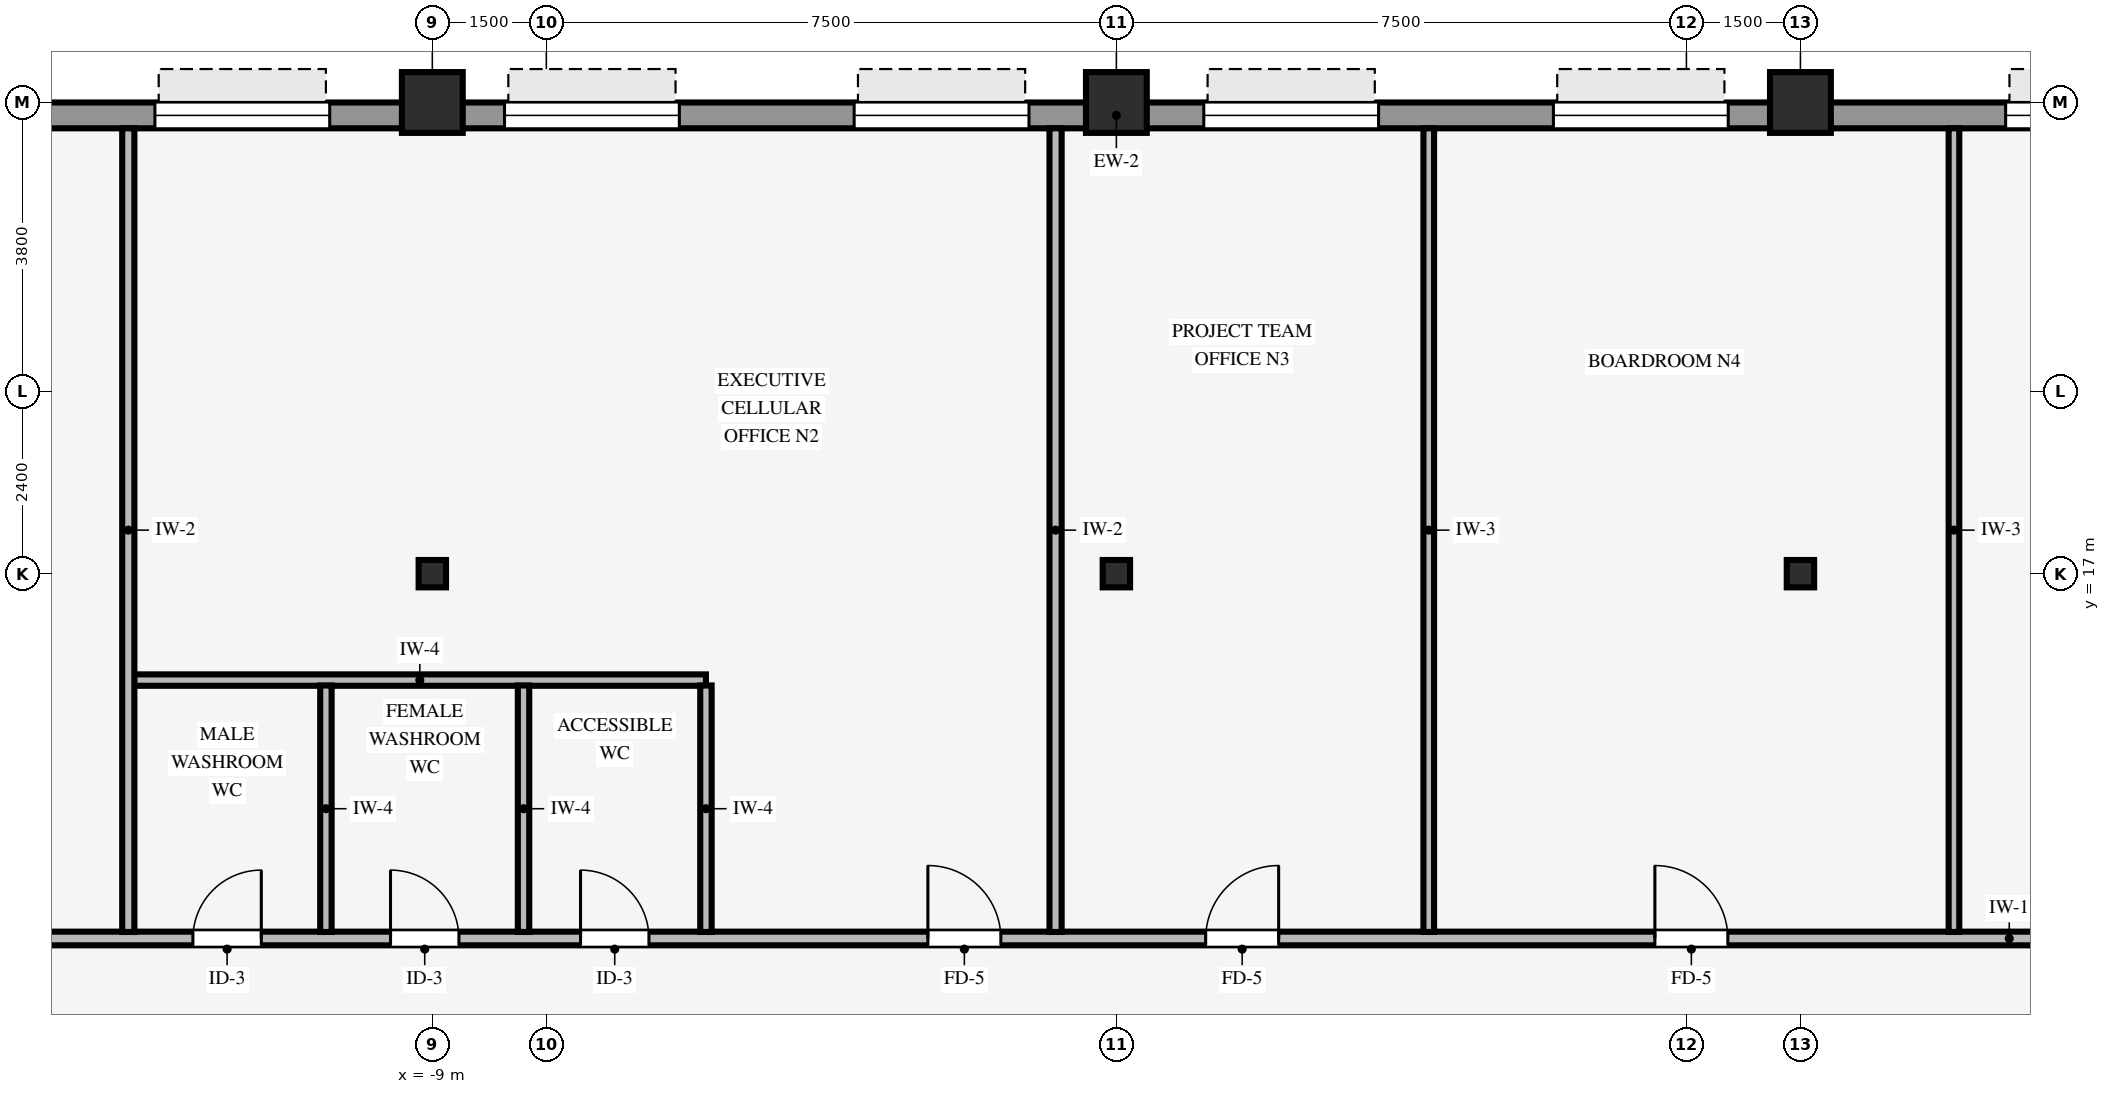
"""IFC4 building model, lengths in metres.
Left out: names, types, materials, properties, quantities, classifications, styles, units other than length and angle.
Written with IfcOpenShell. Run it as: python <this file> out.ifc"""

import sys

from ifc_helpers import new_model, si_unit, direction, frame, frame_2d, origin, origin_2d, place, context, subcontext, project, spatial, rectangle, hollow_rectangle, i_section, extrude, source, transform, mapped, element, fill, save


model = new_model("IFC4")
c1 = context("Model", 3, precision=1e-05, world=origin(), true_north=direction((0.0, 1.0)))
c2 = subcontext(c1, "Body", "Model", "MODEL_VIEW")
j1 = project(units=[si_unit("LENGTHUNIT", "METRE"), si_unit("PLANEANGLEUNIT", "RADIAN")], contexts=[c1])
p1 = place(None, origin())
s1 = spatial("IfcSite", under=j1, at=p1, CompositionType="ELEMENT")
p2 = place(p1, origin())
s2 = spatial("IfcBuilding", under=s1, at=p2, CompositionType="ELEMENT")
p3 = place(p2, frame((0.0, 0.0, 75.05)))
s3 = spatial("IfcBuildingStorey", under=s2, at=p3, CompositionType="ELEMENT", Elevation=75.05)
for number, where, z_axis, x_axis in (
    (1, (-9.0, 23.2, 0.0), (0.0, 0.0, 1.0), (1.0, 0.0, 0.0)),
    (2, (0.0, 23.2, 0.0), (0.0, 0.0, 1.0), (1.0, 0.0, 0.0)),
    (3, (9.0, 23.2, 0.0), (0.0, 0.0, 1.0), (1.0, 0.0, 0.0)),
):
    element("IfcColumn", number, at=place(p3, frame(where, z_axis=z_axis, x_axis=x_axis)), inside=s3, PredefinedType="COLUMN", context=c2, shape_type="SweptSolid", body=[
        extrude(hollow_rectangle(XDim=0.8, YDim=0.8, WallThickness=0.055, InnerFilletRadius=0.055, OuterFilletRadius=0.11, at=origin_2d()), origin(), (0.0, 0.0, 1.0), 3.37),
    ])
for number, where, z_axis, x_axis in (
    (4, (0.0, 17.0, 0.0), (0.0, 0.0, 1.0), (1.0, 0.0, 0.0)),
    (5, (-9.0, 17.0, 0.0), (0.0, 0.0, 1.0), (1.0, 0.0, 0.0)),
    (6, (9.0, 17.0, 0.0), (0.0, 0.0, 1.0), (1.0, 0.0, 0.0)),
):
    element("IfcColumn", number, at=place(p3, frame(where, z_axis=z_axis, x_axis=x_axis)), inside=s3, PredefinedType="COLUMN", context=c2, shape_type="SweptSolid", body=[
        extrude(i_section(OverallWidth=0.36, OverallDepth=0.36, WebThickness=0.021, FlangeThickness=0.021, FilletRadius=0.018, at=origin_2d()), origin(), (0.0, 0.0, 1.0), 3.37),
    ])
p4 = place(p3, frame((-19.4, 23.03, 0.0), z_axis=(0.0, 0.0, 1.0), x_axis=(1.0, 0.0, 0.0)))
e7 = element("IfcWall", 7, at=p4, inside=s3, PredefinedType="STANDARD", context=c2, shape_type="SweptSolid", body=[
    extrude(rectangle(XDim=38.8, YDim=0.34, at=frame_2d((19.4, 0.0))), origin(), (0.0, 0.0, 1.0), 2.705),
])
p5 = place(p4, frame((2.15, 0.0, 0.8)))
e8 = element("IfcOpeningElement", 8, at=p5, cuts=e7, PredefinedType="OPENING", context=c2, shape_type="SweptSolid", body=[
    extrude(rectangle(XDim=2.3, YDim=1.62, at=frame_2d((1.15, 0.81))), frame((0.0, 0.18, 0.0), z_axis=(0.0, -1.0, 0.0), x_axis=(1.0, 0.0, 0.0)), (0.0, 0.0, 1.0), 0.36),
])
p6 = place(p4, frame((6.75, 0.0, 0.8)))
e9 = element("IfcOpeningElement", 9, at=p6, cuts=e7, PredefinedType="OPENING", context=c2, shape_type="SweptSolid", body=[
    extrude(rectangle(XDim=2.3, YDim=1.62, at=frame_2d((1.15, 0.81))), frame((0.0, 0.18, 0.0), z_axis=(0.0, -1.0, 0.0), x_axis=(1.0, 0.0, 0.0)), (0.0, 0.0, 1.0), 0.36),
])
p7 = place(p4, frame((11.35, 0.0, 0.8)))
e10 = element("IfcOpeningElement", 10, at=p7, cuts=e7, PredefinedType="OPENING", context=c2, shape_type="SweptSolid", body=[
    extrude(rectangle(XDim=2.3, YDim=1.62, at=frame_2d((1.15, 0.81))), frame((0.0, 0.18, 0.0), z_axis=(0.0, -1.0, 0.0), x_axis=(1.0, 0.0, 0.0)), (0.0, 0.0, 1.0), 0.36),
])
p8 = place(p4, frame((15.95, 0.0, 0.8)))
e11 = element("IfcOpeningElement", 11, at=p8, cuts=e7, PredefinedType="OPENING", context=c2, shape_type="SweptSolid", body=[
    extrude(rectangle(XDim=2.3, YDim=1.62, at=frame_2d((1.15, 0.81))), frame((0.0, 0.18, 0.0), z_axis=(0.0, -1.0, 0.0), x_axis=(1.0, 0.0, 0.0)), (0.0, 0.0, 1.0), 0.36),
])
p9 = place(p4, frame((20.55, 0.0, 0.8)))
e12 = element("IfcOpeningElement", 12, at=p9, cuts=e7, PredefinedType="OPENING", context=c2, shape_type="SweptSolid", body=[
    extrude(rectangle(XDim=2.3, YDim=1.62, at=frame_2d((1.15, 0.81))), frame((0.0, 0.18, 0.0), z_axis=(0.0, -1.0, 0.0), x_axis=(1.0, 0.0, 0.0)), (0.0, 0.0, 1.0), 0.36),
])
p10 = place(p4, frame((25.15, 0.0, 0.8)))
e13 = element("IfcOpeningElement", 13, at=p10, cuts=e7, PredefinedType="OPENING", context=c2, shape_type="SweptSolid", body=[
    extrude(rectangle(XDim=2.3, YDim=1.62, at=frame_2d((1.15, 0.81))), frame((0.0, 0.18, 0.0), z_axis=(0.0, -1.0, 0.0), x_axis=(1.0, 0.0, 0.0)), (0.0, 0.0, 1.0), 0.36),
])
p11 = place(p4, frame((31.1, 0.0, 0.8)))
e14 = element("IfcOpeningElement", 14, at=p11, cuts=e7, PredefinedType="OPENING", context=c2, shape_type="SweptSolid", body=[
    extrude(rectangle(XDim=2.3, YDim=1.62, at=frame_2d((1.15, 0.81))), frame((0.0, 0.18, 0.0), z_axis=(0.0, -1.0, 0.0), x_axis=(1.0, 0.0, 0.0)), (0.0, 0.0, 1.0), 0.36),
])
p12 = place(p4, frame((34.35, 0.0, 0.8)))
e15 = element("IfcOpeningElement", 15, at=p12, cuts=e7, PredefinedType="OPENING", context=c2, shape_type="SweptSolid", body=[
    extrude(rectangle(XDim=2.3, YDim=1.62, at=frame_2d((1.15, 0.81))), frame((0.0, 0.18, 0.0), z_axis=(0.0, -1.0, 0.0), x_axis=(1.0, 0.0, 0.0)), (0.0, 0.0, 1.0), 0.36),
])
p13 = place(p3, frame((-15.0, 12.2, 0.0), z_axis=(0.0, 0.0, 1.0), x_axis=(1.0, 0.0, 0.0)))
e16 = element("IfcWall", 16, at=p13, inside=s3, PredefinedType="PARTITIONING", context=c2, shape_type="SweptSolid", body=[
    extrude(rectangle(XDim=30.0, YDim=0.18, at=frame_2d((15.0, 0.0))), origin(), (0.0, 0.0, 1.0), 3.36),
])
p14 = place(p13, frame((22.085, 0.0, 0.0)))
e17 = element("IfcOpeningElement", 17, at=p14, cuts=e16, PredefinedType="OPENING", context=c2, shape_type="SweptSolid", body=[
    extrude(rectangle(XDim=0.96, YDim=2.1, at=frame_2d((0.48, 1.05))), frame((0.0, 0.1, 0.0), z_axis=(0.0, -1.0, 0.0), x_axis=(1.0, 0.0, 0.0)), (0.0, 0.0, 1.0), 0.2),
])
p15 = place(p13, frame((16.175, 0.0, 0.0)))
e18 = element("IfcOpeningElement", 18, at=p15, cuts=e16, PredefinedType="OPENING", context=c2, shape_type="SweptSolid", body=[
    extrude(rectangle(XDim=0.96, YDim=2.1, at=frame_2d((0.48, 1.05))), frame((0.0, 0.1, 0.0), z_axis=(0.0, -1.0, 0.0), x_axis=(1.0, 0.0, 0.0)), (0.0, 0.0, 1.0), 0.2),
])
p16 = place(p13, frame((5.45, 0.0, 0.0)))
e19 = element("IfcOpeningElement", 19, at=p16, cuts=e16, PredefinedType="OPENING", context=c2, shape_type="SweptSolid", body=[
    extrude(rectangle(XDim=0.9, YDim=2.1, at=frame_2d((0.45, 1.05))), frame((0.0, 0.1, 0.0), z_axis=(0.0, -1.0, 0.0), x_axis=(1.0, 0.0, 0.0)), (0.0, 0.0, 1.0), 0.2),
])
p17 = place(p13, frame((2.85, 0.0, 0.0)))
e20 = element("IfcOpeningElement", 20, at=p17, cuts=e16, PredefinedType="OPENING", context=c2, shape_type="SweptSolid", body=[
    extrude(rectangle(XDim=0.9, YDim=2.1, at=frame_2d((0.45, 1.05))), frame((0.0, 0.1, 0.0), z_axis=(0.0, -1.0, 0.0), x_axis=(1.0, 0.0, 0.0)), (0.0, 0.0, 1.0), 0.2),
])
p18 = place(p13, frame((12.52, 0.0, 0.0)))
e21 = element("IfcOpeningElement", 21, at=p18, cuts=e16, PredefinedType="OPENING", context=c2, shape_type="SweptSolid", body=[
    extrude(rectangle(XDim=0.96, YDim=2.1, at=frame_2d((0.48, 1.05))), frame((0.0, 0.1, 0.0), z_axis=(0.0, -1.0, 0.0), x_axis=(1.0, 0.0, 0.0)), (0.0, 0.0, 1.0), 0.2),
])
p19 = place(p13, frame((7.95, 0.0, 0.0)))
e22 = element("IfcOpeningElement", 22, at=p19, cuts=e16, PredefinedType="OPENING", context=c2, shape_type="SweptSolid", body=[
    extrude(rectangle(XDim=0.9, YDim=2.1, at=frame_2d((0.45, 1.05))), frame((0.0, 0.1, 0.0), z_axis=(0.0, -1.0, 0.0), x_axis=(1.0, 0.0, 0.0)), (0.0, 0.0, 1.0), 0.2),
])
p20 = place(p3, frame((-12.929, 15.6, 0.0), z_axis=(0.0, 0.0, 1.0), x_axis=(1.0, 0.0, 0.0)))
e23 = element("IfcWall", 23, at=p20, inside=s3, PredefinedType="PARTITIONING", context=c2, shape_type="SweptSolid", body=[
    extrude(rectangle(XDim=7.529, YDim=0.15, at=frame_2d((3.765, 0.0))), origin(), (0.0, 0.0, 1.0), 3.36),
])
p21 = place(p3, frame((-13.0, 12.286, 0.0), z_axis=(0.0, 0.0, 1.0), x_axis=(0.0, 1.0, 0.0)))
e24 = element("IfcWall", 24, at=p21, inside=s3, PredefinedType="PARTITIONING", context=c2, shape_type="SweptSolid", body=[
    extrude(rectangle(XDim=10.574, YDim=0.16, at=frame_2d((5.287, 0.0))), origin(), (0.0, 0.0, 1.0), 3.36),
])
for number, where, z_axis, x_axis in (
    (25, (-10.4, 12.286, 0.0), (0.0, 0.0, 1.0), (0.0, 1.0, 0.0)),
    (26, (-7.8, 12.286, 0.0), (0.0, 0.0, 1.0), (0.0, 1.0, 0.0)),
    (27, (-5.4, 12.286, 0.0), (0.0, 0.0, 1.0), (0.0, 1.0, 0.0)),
):
    element("IfcWall", number, at=place(p3, frame(where, z_axis=z_axis, x_axis=x_axis)), inside=s3, PredefinedType="PARTITIONING", context=c2, shape_type="SweptSolid", body=[
        extrude(rectangle(XDim=3.243, YDim=0.15, at=frame_2d((1.622, 0.0))), origin(), (0.0, 0.0, 1.0), 3.36),
    ])
p22 = place(p3, frame((-0.8, 12.286, 0.0), z_axis=(0.0, 0.0, 1.0), x_axis=(0.0, 1.0, 0.0)))
e28 = element("IfcWall", 28, at=p22, inside=s3, PredefinedType="PARTITIONING", context=c2, shape_type="SweptSolid", body=[
    extrude(rectangle(XDim=10.574, YDim=0.16, at=frame_2d((5.287, 0.0))), origin(), (0.0, 0.0, 1.0), 3.36),
])
for number, where, z_axis, x_axis in (
    (29, (4.11, 12.286, 0.0), (0.0, 0.0, 1.0), (0.0, 1.0, 0.0)),
    (30, (11.02, 12.286, 0.0), (0.0, 0.0, 1.0), (0.0, 1.0, 0.0)),
):
    element("IfcWall", number, at=place(p3, frame(where, z_axis=z_axis, x_axis=x_axis)), inside=s3, PredefinedType="PARTITIONING", context=c2, shape_type="SweptSolid", body=[
        extrude(rectangle(XDim=10.574, YDim=0.14, at=frame_2d((5.287, 0.0))), origin(), (0.0, 0.0, 1.0), 3.36),
    ])
m1 = source(origin(), c2, "Body", "SweptSolid", [
    extrude(rectangle(XDim=2.3, YDim=1.62, at=frame_2d((1.15, 0.81))), frame((0.0, 0.03, 0.0), z_axis=(0.0, -1.0, 0.0), x_axis=(1.0, 0.0, 0.0)), (0.0, 0.0, 1.0), 0.06),
])
p23 = place(p6, origin())
e31 = element("IfcWindow", 31, at=p23, inside=s3, PartitioningType="SINGLE_PANEL", PredefinedType="WINDOW", context=c2, shape_type="MappedRepresentation", body=[
    mapped(m1, transform((0.0, 0.0, 0.0), scale=1.0)),
])
fill(e9, e31)
p24 = place(p7, origin())
e32 = element("IfcWindow", 32, at=p24, inside=s3, PartitioningType="SINGLE_PANEL", PredefinedType="WINDOW", context=c2, shape_type="MappedRepresentation", body=[
    mapped(m1, transform((0.0, 0.0, 0.0), scale=1.0)),
])
fill(e10, e32)
p25 = place(p8, origin())
e33 = element("IfcWindow", 33, at=p25, inside=s3, PartitioningType="SINGLE_PANEL", PredefinedType="WINDOW", context=c2, shape_type="MappedRepresentation", body=[
    mapped(m1, transform((0.0, 0.0, 0.0), scale=1.0)),
])
fill(e11, e33)
p26 = place(p9, origin())
e34 = element("IfcWindow", 34, at=p26, inside=s3, PartitioningType="SINGLE_PANEL", PredefinedType="WINDOW", context=c2, shape_type="MappedRepresentation", body=[
    mapped(m1, transform((0.0, 0.0, 0.0), scale=1.0)),
])
fill(e12, e34)
p27 = place(p10, origin())
e35 = element("IfcWindow", 35, at=p27, inside=s3, PartitioningType="SINGLE_PANEL", PredefinedType="WINDOW", context=c2, shape_type="MappedRepresentation", body=[
    mapped(m1, transform((0.0, 0.0, 0.0), scale=1.0)),
])
fill(e13, e35)
p28 = place(p11, origin())
e36 = element("IfcWindow", 36, at=p28, inside=s3, PartitioningType="SINGLE_PANEL", PredefinedType="WINDOW", context=c2, shape_type="MappedRepresentation", body=[
    mapped(m1, transform((0.0, 0.0, 0.0), scale=1.0)),
])
fill(e14, e36)
m2 = source(origin(), c2, "Body", "SweptSolid", [
    extrude(rectangle(XDim=0.96, YDim=2.1, at=frame_2d((0.48, 1.05))), frame((0.0, 0.025, 0.0), z_axis=(0.0, -1.0, 0.0), x_axis=(1.0, 0.0, 0.0)), (0.0, 0.0, 1.0), 0.05),
])
p29 = place(p14, origin())
e37 = element("IfcDoor", 37, at=p29, inside=s3, OperationType="SINGLE_SWING_LEFT", PredefinedType="DOOR", context=c2, shape_type="MappedRepresentation", body=[
    mapped(m2, transform((0.0, 0.0, 0.0), scale=1.0)),
])
fill(e17, e37)
p30 = place(p15, origin())
e38 = element("IfcDoor", 38, at=p30, inside=s3, OperationType="SINGLE_SWING_RIGHT", PredefinedType="DOOR", context=c2, shape_type="MappedRepresentation", body=[
    mapped(m2, transform((0.0, 0.0, 0.0), scale=1.0)),
])
fill(e18, e38)
m3 = source(origin(), c2, "Body", "SweptSolid", [
    extrude(rectangle(XDim=0.9, YDim=2.1, at=frame_2d((0.45, 1.05))), frame((0.0, 0.025, 0.0), z_axis=(0.0, -1.0, 0.0), x_axis=(1.0, 0.0, 0.0)), (0.0, 0.0, 1.0), 0.05),
])
p31 = place(p16, origin())
e39 = element("IfcDoor", 39, at=p31, inside=s3, OperationType="SINGLE_SWING_LEFT", PredefinedType="DOOR", context=c2, shape_type="MappedRepresentation", body=[
    mapped(m3, transform((0.0, 0.0, 0.0), scale=1.0)),
])
fill(e19, e39)
p32 = place(p17, origin())
e40 = element("IfcDoor", 40, at=p32, inside=s3, OperationType="SINGLE_SWING_RIGHT", PredefinedType="DOOR", context=c2, shape_type="MappedRepresentation", body=[
    mapped(m3, transform((0.0, 0.0, 0.0), scale=1.0)),
])
fill(e20, e40)
p33 = place(p18, origin())
e41 = element("IfcDoor", 41, at=p33, inside=s3, OperationType="SINGLE_SWING_LEFT", PredefinedType="DOOR", context=c2, shape_type="MappedRepresentation", body=[
    mapped(m2, transform((0.0, 0.0, 0.0), scale=1.0)),
])
fill(e21, e41)
p34 = place(p19, origin())
e42 = element("IfcDoor", 42, at=p34, inside=s3, OperationType="SINGLE_SWING_LEFT", PredefinedType="DOOR", context=c2, shape_type="MappedRepresentation", body=[
    mapped(m3, transform((0.0, 0.0, 0.0), scale=1.0)),
])
fill(e22, e42)
save(model, sys.argv[1])
